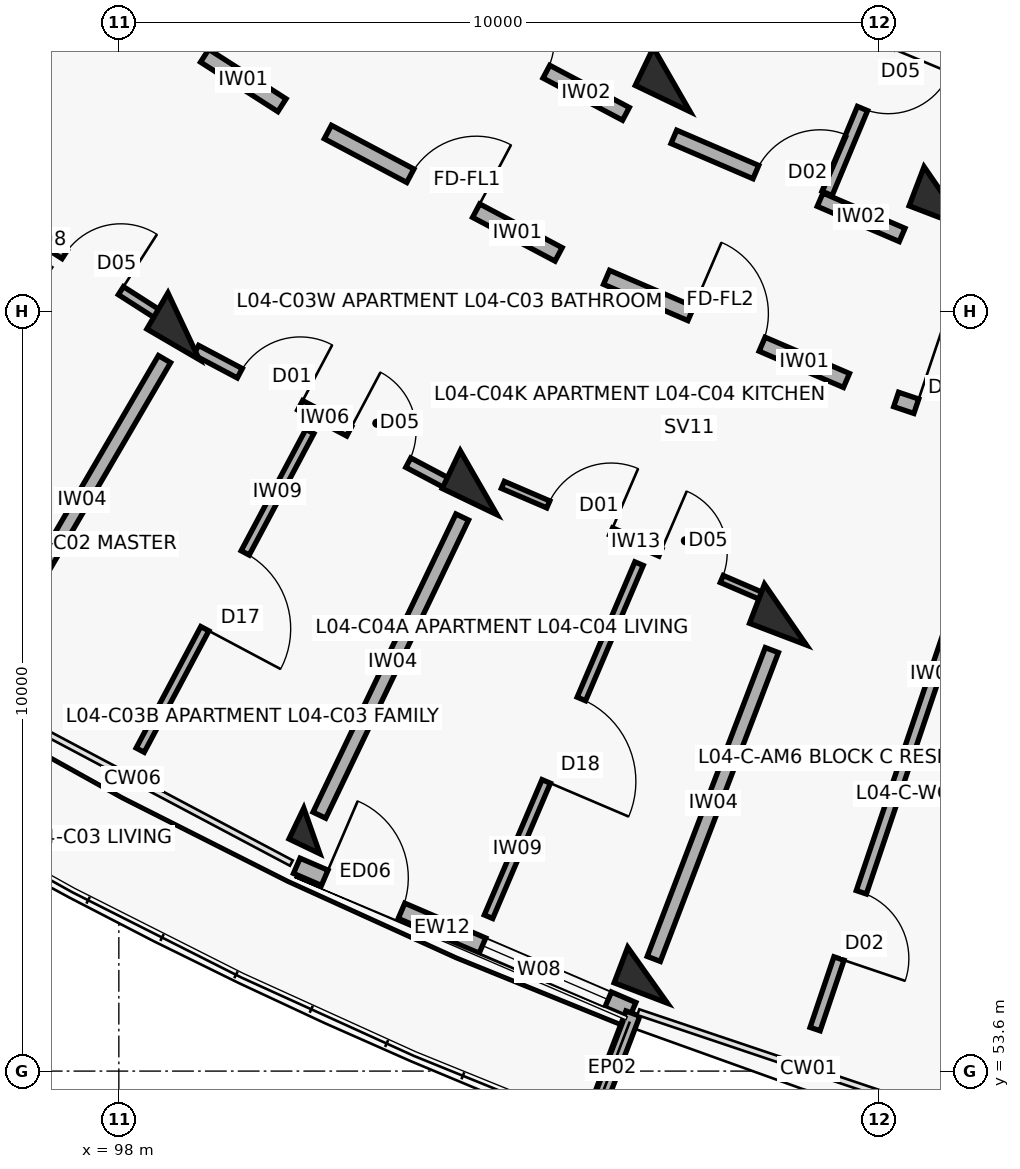
"""IFC4 building model, lengths in metres.
Left out: names, types, materials, properties, quantities, classifications, styles, units other than length and angle.
Written with IfcOpenShell. Run it as: python <this file> out.ifc"""

import sys

from ifc_helpers import new_model, si_unit, direction, frame, frame_2d, origin, origin_2d, place, context, subcontext, project, spatial, rectangle, extrude, element, fill, save


model = new_model("IFC4")
c1 = context("Model", 3, precision=1e-05, world=origin(), true_north=direction((0.0, 1.0)))
c2 = subcontext(c1, "Body", "Model", "MODEL_VIEW")
j1 = project(units=[si_unit("LENGTHUNIT", "METRE"), si_unit("PLANEANGLEUNIT", "RADIAN")], contexts=[c1])
p1 = place(None, origin())
s1 = spatial("IfcSite", under=j1, at=p1, CompositionType="ELEMENT")
p2 = place(p1, origin())
s2 = spatial("IfcBuilding", under=s1, at=p2, CompositionType="ELEMENT")
p3 = place(p2, frame((0.0, 0.0, 14.3)))
s3 = spatial("IfcBuildingStorey", under=s2, at=p3, CompositionType="ELEMENT", Elevation=14.3)
for number, where, z_axis, x_axis in (
    (1, (98.853, 63.4, 0.0), (0.0, 0.0, 1.0), (-0.504, -0.864, 0.0)),
    (2, (105.274, 66.644, 0.0), (0.0, 0.0, 1.0), (-0.432, -0.902, 0.0)),
    (3, (102.734, 61.341, 0.0), (0.0, 0.0, 1.0), (-0.432, -0.902, 0.0)),
):
    element("IfcColumn", number, at=place(p3, frame(where, z_axis=z_axis, x_axis=x_axis)), inside=s3, PredefinedType="COLUMN", context=c2, shape_type="SweptSolid", body=[
        extrude(rectangle(XDim=0.55, YDim=0.8, at=origin_2d()), origin(), (0.0, 0.0, 1.0), 3.1),
    ])
p4 = place(p3, frame((100.539, 56.76, 0.0), z_axis=(0.0, 0.0, 1.0), x_axis=(-0.432085748802, -0.901832526405, 0.0)))
e4 = element("IfcColumn", 4, at=p4, inside=s3, PredefinedType="COLUMN", context=c2, shape_type="SweptSolid", body=[
    extrude(rectangle(XDim=0.45, YDim=0.45, at=origin_2d()), origin(), (0.0, 0.0, 1.0), 3.1),
])
for number, where, z_axis, x_axis in (
    (5, (108.869, 65.099, 0.0), (0.0, 0.0, 1.0), (-0.357, -0.934, 0.0)),
    (6, (106.77, 59.606, 0.0), (0.0, 0.0, 1.0), (-0.357, -0.934, 0.0)),
):
    element("IfcColumn", number, at=place(p3, frame(where, z_axis=z_axis, x_axis=x_axis)), inside=s3, PredefinedType="COLUMN", context=c2, shape_type="SweptSolid", body=[
        extrude(rectangle(XDim=0.55, YDim=0.8, at=origin_2d()), origin(), (0.0, 0.0, 1.0), 3.1),
    ])
p5 = place(p3, frame((104.956, 54.861, 0.0), z_axis=(0.0, 0.0, 1.0), x_axis=(-0.357064076459, -0.934079892355, 0.0)))
e7 = element("IfcColumn", 7, at=p5, inside=s3, PredefinedType="COLUMN", context=c2, shape_type="SweptSolid", body=[
    extrude(rectangle(XDim=0.5, YDim=0.75, at=origin_2d()), origin(), (0.0, 0.0, 1.0), 3.1),
])
p6 = place(p3, frame((100.341, 56.301, 0.0), z_axis=(0.0, 0.0, 1.0), x_axis=(0.918737524932, -0.39486878869, 0.0)))
e8 = element("IfcWall", 8, at=p6, inside=s3, PredefinedType="SOLIDWALL", context=c2, shape_type="SweptSolid", body=[
    extrude(rectangle(XDim=4.809, YDim=0.218, at=frame_2d((2.405, 0.0))), origin(), (0.0, 0.0, 1.0), 2.25),
])
p7 = place(p6, frame((0.4, 0.0, 0.0)))
e9 = element("IfcOpeningElement", 9, at=p7, cuts=e8, PredefinedType="OPENING", context=c2, shape_type="SweptSolid", body=[
    extrude(rectangle(XDim=1.1, YDim=2.15, at=frame_2d((0.55, 1.075))), frame((0.0, 0.119, 0.0), z_axis=(0.0, -1.0, 0.0), x_axis=(1.0, 0.0, 0.0)), (0.0, 0.0, 1.0), 0.238),
])
p8 = place(p6, frame((2.659, 0.0, 0.35)))
e10 = element("IfcOpeningElement", 10, at=p8, cuts=e8, PredefinedType="OPENING", context=c2, shape_type="SweptSolid", body=[
    extrude(rectangle(XDim=1.8, YDim=1.65, at=frame_2d((0.9, 0.825))), frame((0.0, 0.119, 0.0), z_axis=(0.0, -1.0, 0.0), x_axis=(1.0, 0.0, 0.0)), (0.0, 0.0, 1.0), 0.238),
])
p9 = place(p3, frame((104.763, 54.357, 0.0), z_axis=(0.0, 0.0, 1.0), x_axis=(-0.356957296461, -0.934120703391, 0.0)))
e11 = element("IfcWall", 11, at=p9, inside=s3, PredefinedType="PARAPET", context=c2, shape_type="SweptSolid", body=[
    extrude(rectangle(XDim=1.53, YDim=0.195, at=frame_2d((0.765, 0.0))), origin(), (0.0, 0.0, 1.0), 2.25),
])
p10 = place(p3, frame((97.252, 68.161, 0.0), z_axis=(0.0, 0.0, 1.0), x_axis=(0.842289466461, -0.53902546757, 0.0)))
e12 = element("IfcWall", 12, at=p10, inside=s3, PredefinedType="SOLIDWALL", context=c2, shape_type="SweptSolid", body=[
    extrude(rectangle(XDim=3.436, YDim=0.2, at=frame_2d((1.718, 0.0))), origin(), (0.0, 0.0, 1.0), 2.08),
])
p11 = place(p10, frame((1.208, 0.0, 0.0)))
e13 = element("IfcOpeningElement", 13, at=p11, cuts=e12, PredefinedType="OPENING", context=c2, shape_type="SweptSolid", body=[
    extrude(rectangle(XDim=1.02, YDim=2.15, at=frame_2d((0.51, 1.075))), frame((0.0, 0.11, 0.0), z_axis=(0.0, -1.0, 0.0), x_axis=(1.0, 0.0, 0.0)), (0.0, 0.0, 1.0), 0.22),
])
p12 = place(p3, frame((95.376, 65.565, 0.0), z_axis=(0.0, 0.0, 1.0), x_axis=(0.842242208372, -0.539099306656, 0.0)))
e14 = element("IfcWall", 14, at=p12, inside=s3, PredefinedType="PARTITIONING", context=c2, shape_type="SweptSolid", body=[
    extrude(rectangle(XDim=3.797, YDim=0.125, at=frame_2d((1.899, 0.0))), origin(), (0.0, 0.0, 1.0), 2.08),
])
p13 = place(p12, frame((0.65, 0.0, 0.0)))
e15 = element("IfcOpeningElement", 15, at=p13, cuts=e14, PredefinedType="OPENING", context=c2, shape_type="SweptSolid", body=[
    extrude(rectangle(XDim=0.9, YDim=2.1, at=frame_2d((0.45, 1.05))), frame((0.0, 0.073, 0.0), z_axis=(0.0, -1.0, 0.0), x_axis=(1.0, 0.0, 0.0)), (0.0, 0.0, 1.0), 0.145),
])
p14 = place(p12, frame((2.267, 0.0, 0.0)))
e16 = element("IfcOpeningElement", 16, at=p14, cuts=e14, PredefinedType="OPENING", context=c2, shape_type="SweptSolid", body=[
    extrude(rectangle(XDim=0.88, YDim=2.1, at=frame_2d((0.44, 1.05))), frame((0.0, 0.073, 0.0), z_axis=(0.0, -1.0, 0.0), x_axis=(1.0, 0.0, 0.0)), (0.0, 0.0, 1.0), 0.145),
])
p15 = place(p3, frame((100.75, 65.956, 0.0), z_axis=(0.0, 0.0, 1.0), x_axis=(0.883440266101, -0.468543803963, 0.0)))
e17 = element("IfcWall", 17, at=p15, inside=s3, PredefinedType="SOLIDWALL", context=c2, shape_type="SweptSolid", body=[
    extrude(rectangle(XDim=3.436, YDim=0.2, at=frame_2d((1.718, 0.0))), origin(), (0.0, 0.0, 1.0), 2.08),
])
p16 = place(p15, frame((1.228, 0.0, 0.0)))
e18 = element("IfcOpeningElement", 18, at=p16, cuts=e17, PredefinedType="OPENING", context=c2, shape_type="SweptSolid", body=[
    extrude(rectangle(XDim=0.98, YDim=2.15, at=frame_2d((0.49, 1.075))), frame((0.0, 0.11, 0.0), z_axis=(0.0, -1.0, 0.0), x_axis=(1.0, 0.0, 0.0)), (0.0, 0.0, 1.0), 0.22),
])
p17 = place(p3, frame((101.784, 67.726, 0.0), z_axis=(0.0, 0.0, 1.0), x_axis=(0.883444301944, -0.468536194293, 0.0)))
e19 = element("IfcWall", 19, at=p17, inside=s3, PredefinedType="SOLIDWALL", context=c2, shape_type="SweptSolid", body=[
    extrude(rectangle(XDim=3.269, YDim=0.19, at=frame_2d((1.634, 0.0))), origin(), (0.0, 0.0, 1.0), 2.08),
])
p18 = place(p17, frame((1.184, 0.0, 0.0)))
e20 = element("IfcOpeningElement", 20, at=p18, cuts=e19, PredefinedType="OPENING", context=c2, shape_type="SweptSolid", body=[
    extrude(rectangle(XDim=0.9, YDim=2.1, at=frame_2d((0.45, 1.05))), frame((0.0, 0.105, 0.0), z_axis=(0.0, -1.0, 0.0), x_axis=(1.0, 0.0, 0.0)), (0.0, 0.0, 1.0), 0.21),
])
p19 = place(p3, frame((99.017, 63.087, 0.0), z_axis=(0.0, 0.0, 1.0), x_axis=(0.883415075746, -0.468591297342, 0.0)))
e21 = element("IfcWall", 21, at=p19, inside=s3, PredefinedType="PARTITIONING", context=c2, shape_type="SweptSolid", body=[
    extrude(rectangle(XDim=3.81, YDim=0.14, at=frame_2d((1.905, 0.0))), origin(), (0.0, 0.0, 1.0), 2.08),
])
p20 = place(p19, frame((0.65, 0.0, 0.0)))
e22 = element("IfcOpeningElement", 22, at=p20, cuts=e21, PredefinedType="OPENING", context=c2, shape_type="SweptSolid", body=[
    extrude(rectangle(XDim=0.9, YDim=2.1, at=frame_2d((0.45, 1.05))), frame((0.0, 0.08, 0.0), z_axis=(0.0, -1.0, 0.0), x_axis=(1.0, 0.0, 0.0)), (0.0, 0.0, 1.0), 0.16),
])
p21 = place(p19, frame((2.28, 0.0, 0.0)))
e23 = element("IfcOpeningElement", 23, at=p21, cuts=e21, PredefinedType="OPENING", context=c2, shape_type="SweptSolid", body=[
    extrude(rectangle(XDim=0.88, YDim=2.1, at=frame_2d((0.44, 1.05))), frame((0.0, 0.08, 0.0), z_axis=(0.0, -1.0, 0.0), x_axis=(1.0, 0.0, 0.0)), (0.0, 0.0, 1.0), 0.16),
])
p22 = place(p3, frame((100.513, 62.016, 0.0), z_axis=(0.0, 0.0, 1.0), x_axis=(-0.469889133168, -0.882725440061, 0.0)))
e24 = element("IfcWall", 24, at=p22, inside=s3, PredefinedType="PARTITIONING", context=c2, shape_type="SweptSolid", body=[
    extrude(rectangle(XDim=4.75, YDim=0.12, at=frame_2d((2.375, 0.0))), origin(), (0.0, 0.0, 1.0), 2.08),
])
p23 = place(p22, frame((1.81, 0.0, 0.0)))
e25 = element("IfcOpeningElement", 25, at=p23, cuts=e24, PredefinedType="OPENING", context=c2, shape_type="SweptSolid", body=[
    extrude(rectangle(XDim=1.13, YDim=2.1, at=frame_2d((0.565, 1.05))), frame((0.0, 0.07, 0.0), z_axis=(0.0, -1.0, 0.0), x_axis=(1.0, 0.0, 0.0)), (0.0, 0.0, 1.0), 0.14),
])
p24 = place(p3, frame((98.601, 62.968, 0.0), z_axis=(0.0, 0.0, 1.0), x_axis=(-0.504216452091, -0.863577309475, 0.0)))
e26 = element("IfcWall", 26, at=p24, inside=s3, PredefinedType="SOLIDWALL", context=c2, shape_type="SweptSolid", body=[
    extrude(rectangle(XDim=4.35, YDim=0.185, at=frame_2d((2.175, 0.0))), origin(), (0.0, 0.0, 1.0), 2.08),
])
p25 = place(p3, frame((104.417, 64.044, 0.0), z_axis=(0.0, 0.0, 1.0), x_axis=(0.918718172399, -0.394913813008, 0.0)))
e27 = element("IfcWall", 27, at=p25, inside=s3, PredefinedType="SOLIDWALL", context=c2, shape_type="SweptSolid", body=[
    extrude(rectangle(XDim=3.436, YDim=0.2, at=frame_2d((1.718, 0.0))), origin(), (0.0, 0.0, 1.0), 2.08),
])
p26 = place(p25, frame((1.208, 0.0, 0.0)))
e28 = element("IfcOpeningElement", 28, at=p26, cuts=e27, PredefinedType="OPENING", context=c2, shape_type="SweptSolid", body=[
    extrude(rectangle(XDim=1.02, YDim=2.15, at=frame_2d((0.51, 1.075))), frame((0.0, 0.11, 0.0), z_axis=(0.0, -1.0, 0.0), x_axis=(1.0, 0.0, 0.0)), (0.0, 0.0, 1.0), 0.22),
])
p27 = place(p3, frame((105.302, 65.893, 0.0), z_axis=(0.0, 0.0, 1.0), x_axis=(0.918723391052, -0.394901672235, 0.0)))
e29 = element("IfcWall", 29, at=p27, inside=s3, PredefinedType="SOLIDWALL", context=c2, shape_type="SweptSolid", body=[
    extrude(rectangle(XDim=3.269, YDim=0.19, at=frame_2d((1.634, 0.0))), origin(), (0.0, 0.0, 1.0), 2.08),
])
p28 = place(p27, frame((1.174, 0.0, 0.0)))
e30 = element("IfcOpeningElement", 30, at=p28, cuts=e29, PredefinedType="OPENING", context=c2, shape_type="SweptSolid", body=[
    extrude(rectangle(XDim=0.92, YDim=2.1, at=frame_2d((0.46, 1.05))), frame((0.0, 0.105, 0.0), z_axis=(0.0, -1.0, 0.0), x_axis=(1.0, 0.0, 0.0)), (0.0, 0.0, 1.0), 0.21),
])
p29 = place(p3, frame((108.589, 68.194, 0.0), z_axis=(0.0, 0.0, 1.0), x_axis=(-0.385151143297, -0.922853507777, 0.0)))
e31 = element("IfcWall", 31, at=p29, inside=s3, PredefinedType="PARTITIONING", context=c2, shape_type="SweptSolid", body=[
    extrude(rectangle(XDim=3.3, YDim=0.145, at=frame_2d((1.65, 0.0))), origin(), (0.0, 0.0, 1.0), 2.08),
])
p30 = place(p29, frame((1.21, 0.0, 0.0)))
e32 = element("IfcOpeningElement", 32, at=p30, cuts=e31, PredefinedType="OPENING", context=c2, shape_type="SweptSolid", body=[
    extrude(rectangle(XDim=0.88, YDim=2.1, at=frame_2d((0.44, 1.05))), frame((0.0, 0.083, 0.0), z_axis=(0.0, -1.0, 0.0), x_axis=(1.0, 0.0, 0.0)), (0.0, 0.0, 1.0), 0.165),
])
p31 = place(p3, frame((103.052, 61.313, 0.0), z_axis=(0.0, 0.0, 1.0), x_axis=(0.918714121981, -0.39492323567, 0.0)))
e33 = element("IfcWall", 33, at=p31, inside=s3, PredefinedType="PARTITIONING", context=c2, shape_type="SweptSolid", body=[
    extrude(rectangle(XDim=3.785, YDim=0.1, at=frame_2d((1.893, 0.0))), origin(), (0.0, 0.0, 1.0), 2.08),
])
p32 = place(p31, frame((0.65, 0.0, 0.0)))
e34 = element("IfcOpeningElement", 34, at=p32, cuts=e33, PredefinedType="OPENING", context=c2, shape_type="SweptSolid", body=[
    extrude(rectangle(XDim=0.9, YDim=2.1, at=frame_2d((0.45, 1.05))), frame((0.0, 0.06, 0.0), z_axis=(0.0, -1.0, 0.0), x_axis=(1.0, 0.0, 0.0)), (0.0, 0.0, 1.0), 0.12),
])
p33 = place(p31, frame((2.255, 0.0, 0.0)))
e35 = element("IfcOpeningElement", 35, at=p33, cuts=e33, PredefinedType="OPENING", context=c2, shape_type="SweptSolid", body=[
    extrude(rectangle(XDim=0.88, YDim=2.1, at=frame_2d((0.44, 1.05))), frame((0.0, 0.06, 0.0), z_axis=(0.0, -1.0, 0.0), x_axis=(1.0, 0.0, 0.0)), (0.0, 0.0, 1.0), 0.12),
])
p34 = place(p3, frame((104.844, 60.277, 0.0), z_axis=(0.0, 0.0, 1.0), x_axis=(-0.392127280422, -0.919910971751, 0.0)))
e36 = element("IfcWall", 36, at=p34, inside=s3, PredefinedType="PARTITIONING", context=c2, shape_type="SweptSolid", body=[
    extrude(rectangle(XDim=5.05, YDim=0.12, at=frame_2d((2.525, 0.0))), origin(), (0.0, 0.0, 1.0), 2.08),
])
p35 = place(p34, frame((1.935, 0.0, 0.0)))
e37 = element("IfcOpeningElement", 37, at=p35, cuts=e36, PredefinedType="OPENING", context=c2, shape_type="SweptSolid", body=[
    extrude(rectangle(XDim=1.18, YDim=2.1, at=frame_2d((0.59, 1.05))), frame((0.0, 0.07, 0.0), z_axis=(0.0, -1.0, 0.0), x_axis=(1.0, 0.0, 0.0)), (0.0, 0.0, 1.0), 0.14),
])
p36 = place(p3, frame((102.518, 60.89, 0.0), z_axis=(0.0, 0.0, 1.0), x_axis=(-0.432108769108, -0.901821496561, 0.0)))
e38 = element("IfcWall", 38, at=p36, inside=s3, PredefinedType="SOLIDWALL", context=c2, shape_type="SweptSolid", body=[
    extrude(rectangle(XDim=4.35, YDim=0.185, at=frame_2d((2.175, 0.0))), origin(), (0.0, 0.0, 1.0), 2.08),
])
p37 = place(p3, frame((108.227, 62.437, 0.0), z_axis=(0.0, 0.0, 1.0), x_axis=(0.947884468821, -0.318614239745, 0.0)))
e39 = element("IfcWall", 39, at=p37, inside=s3, PredefinedType="SOLIDWALL", context=c2, shape_type="SweptSolid", body=[
    extrude(rectangle(XDim=3.436, YDim=0.2, at=frame_2d((1.718, 0.0))), origin(), (0.0, 0.0, 1.0), 2.08),
])
p38 = place(p37, frame((0.28, 0.0, 0.0)))
e40 = element("IfcOpeningElement", 40, at=p38, cuts=e39, PredefinedType="OPENING", context=c2, shape_type="SweptSolid", body=[
    extrude(rectangle(XDim=1.12, YDim=2.15, at=frame_2d((0.56, 1.075))), frame((0.0, 0.11, 0.0), z_axis=(0.0, -1.0, 0.0), x_axis=(1.0, 0.0, 0.0)), (0.0, 0.0, 1.0), 0.22),
])
p39 = place(p37, frame((2.266, 0.0, 0.0)))
e41 = element("IfcOpeningElement", 41, at=p39, cuts=e39, PredefinedType="OPENING", context=c2, shape_type="SweptSolid", body=[
    extrude(rectangle(XDim=0.95, YDim=2.1, at=frame_2d((0.475, 1.05))), frame((0.0, 0.11, 0.0), z_axis=(0.0, -1.0, 0.0), x_axis=(1.0, 0.0, 0.0)), (0.0, 0.0, 1.0), 0.22),
])
p40 = place(p3, frame((109.705, 61.685, 0.0), z_axis=(0.0, 0.0, 1.0), x_axis=(-0.320057771325, -0.947398027766, 0.0)))
e42 = element("IfcWall", 42, at=p40, inside=s3, PredefinedType="PARTITIONING", context=c2, shape_type="SweptSolid", body=[
    extrude(rectangle(XDim=7.95, YDim=0.14, at=frame_2d((3.975, 0.0))), origin(), (0.0, 0.0, 1.0), 2.08),
])
p41 = place(p40, frame((6.05, 0.0, 0.0)))
e43 = element("IfcOpeningElement", 43, at=p41, cuts=e42, PredefinedType="OPENING", context=c2, shape_type="SweptSolid", body=[
    extrude(rectangle(XDim=0.92, YDim=2.1, at=frame_2d((0.46, 1.05))), frame((0.0, 0.08, 0.0), z_axis=(0.0, -1.0, 0.0), x_axis=(1.0, 0.0, 0.0)), (0.0, 0.0, 1.0), 0.16),
])
p42 = place(p3, frame((106.591, 59.139, 0.0), z_axis=(0.0, 0.0, 1.0), x_axis=(-0.357064016205, -0.934079915388, 0.0)))
e44 = element("IfcWall", 44, at=p42, inside=s3, PredefinedType="SOLIDWALL", context=c2, shape_type="SweptSolid", body=[
    extrude(rectangle(XDim=4.35, YDim=0.185, at=frame_2d((2.175, 0.0))), origin(), (0.0, 0.0, 1.0), 2.08),
])
p43 = place(p7, origin())
e45 = element("IfcDoor", 45, at=p43, inside=s3, OperationType="SINGLE_SWING_LEFT", PredefinedType="DOOR", context=c2, shape_type="SweptSolid", body=[
    extrude(rectangle(XDim=1.1, YDim=2.15, at=frame_2d((0.55, 1.075))), frame((0.0, 0.025, 0.0), z_axis=(0.0, -1.0, 0.0), x_axis=(1.0, 0.0, 0.0)), (0.0, 0.0, 1.0), 0.05),
])
fill(e9, e45)
p44 = place(p8, origin())
e46 = element("IfcWindow", 46, at=p44, inside=s3, PartitioningType="TRIPLE_PANEL_VERTICAL", PredefinedType="WINDOW", context=c2, shape_type="SweptSolid", body=[
    extrude(rectangle(XDim=1.8, YDim=1.65, at=frame_2d((0.9, 0.825))), frame((0.0, 0.03, 0.0), z_axis=(0.0, -1.0, 0.0), x_axis=(1.0, 0.0, 0.0)), (0.0, 0.0, 1.0), 0.06),
])
fill(e10, e46)
p45 = place(p11, origin())
e47 = element("IfcDoor", 47, at=p45, inside=s3, OperationType="SINGLE_SWING_RIGHT", PredefinedType="DOOR", context=c2, shape_type="SweptSolid", body=[
    extrude(rectangle(XDim=1.02, YDim=2.15, at=frame_2d((0.51, 1.075))), frame((0.0, 0.025, 0.0), z_axis=(0.0, -1.0, 0.0), x_axis=(1.0, 0.0, 0.0)), (0.0, 0.0, 1.0), 0.05),
])
fill(e13, e47)
p46 = place(p14, origin())
e48 = element("IfcDoor", 48, at=p46, inside=s3, OperationType="SINGLE_SWING_RIGHT", PredefinedType="DOOR", context=c2, shape_type="SweptSolid", body=[
    extrude(rectangle(XDim=0.88, YDim=2.1, at=frame_2d((0.44, 1.05))), frame((0.0, 0.025, 0.0), z_axis=(0.0, -1.0, 0.0), x_axis=(1.0, 0.0, 0.0)), (0.0, 0.0, 1.0), 0.05),
])
fill(e16, e48)
p47 = place(p16, origin())
e49 = element("IfcDoor", 49, at=p47, inside=s3, OperationType="SINGLE_SWING_RIGHT", PredefinedType="DOOR", context=c2, shape_type="SweptSolid", body=[
    extrude(rectangle(XDim=0.98, YDim=2.15, at=frame_2d((0.49, 1.075))), frame((0.0, 0.025, 0.0), z_axis=(0.0, -1.0, 0.0), x_axis=(1.0, 0.0, 0.0)), (0.0, 0.0, 1.0), 0.05),
])
fill(e18, e49)
p48 = place(p18, origin())
e50 = element("IfcDoor", 50, at=p48, inside=s3, OperationType="SINGLE_SWING_LEFT", PredefinedType="DOOR", context=c2, shape_type="SweptSolid", body=[
    extrude(rectangle(XDim=0.9, YDim=2.1, at=frame_2d((0.45, 1.05))), frame((0.0, 0.025, 0.0), z_axis=(0.0, -1.0, 0.0), x_axis=(1.0, 0.0, 0.0)), (0.0, 0.0, 1.0), 0.05),
])
fill(e20, e50)
p49 = place(p20, origin())
e51 = element("IfcDoor", 51, at=p49, inside=s3, OperationType="SINGLE_SWING_RIGHT", PredefinedType="DOOR", context=c2, shape_type="SweptSolid", body=[
    extrude(rectangle(XDim=0.9, YDim=2.1, at=frame_2d((0.45, 1.05))), frame((0.0, 0.025, 0.0), z_axis=(0.0, -1.0, 0.0), x_axis=(1.0, 0.0, 0.0)), (0.0, 0.0, 1.0), 0.05),
])
fill(e22, e51)
p50 = place(p21, origin())
e52 = element("IfcDoor", 52, at=p50, inside=s3, OperationType="SINGLE_SWING_LEFT", PredefinedType="DOOR", context=c2, shape_type="SweptSolid", body=[
    extrude(rectangle(XDim=0.88, YDim=2.1, at=frame_2d((0.44, 1.05))), frame((0.0, 0.025, 0.0), z_axis=(0.0, -1.0, 0.0), x_axis=(1.0, 0.0, 0.0)), (0.0, 0.0, 1.0), 0.05),
])
fill(e23, e52)
p51 = place(p23, origin())
e53 = element("IfcDoor", 53, at=p51, inside=s3, OperationType="SINGLE_SWING_RIGHT", PredefinedType="DOOR", context=c2, shape_type="SweptSolid", body=[
    extrude(rectangle(XDim=1.13, YDim=2.1, at=frame_2d((0.565, 1.05))), frame((0.0, 0.025, 0.0), z_axis=(0.0, -1.0, 0.0), x_axis=(1.0, 0.0, 0.0)), (0.0, 0.0, 1.0), 0.05),
])
fill(e25, e53)
p52 = place(p26, origin())
e54 = element("IfcDoor", 54, at=p52, inside=s3, OperationType="SINGLE_SWING_LEFT", PredefinedType="DOOR", context=c2, shape_type="SweptSolid", body=[
    extrude(rectangle(XDim=1.02, YDim=2.15, at=frame_2d((0.51, 1.075))), frame((0.0, 0.025, 0.0), z_axis=(0.0, -1.0, 0.0), x_axis=(1.0, 0.0, 0.0)), (0.0, 0.0, 1.0), 0.05),
])
fill(e28, e54)
p53 = place(p28, origin())
e55 = element("IfcDoor", 55, at=p53, inside=s3, OperationType="SINGLE_SWING_RIGHT", PredefinedType="DOOR", context=c2, shape_type="SweptSolid", body=[
    extrude(rectangle(XDim=0.92, YDim=2.1, at=frame_2d((0.46, 1.05))), frame((0.0, 0.025, 0.0), z_axis=(0.0, -1.0, 0.0), x_axis=(1.0, 0.0, 0.0)), (0.0, 0.0, 1.0), 0.05),
])
fill(e30, e55)
p54 = place(p30, origin())
e56 = element("IfcDoor", 56, at=p54, inside=s3, OperationType="SINGLE_SWING_LEFT", PredefinedType="DOOR", context=c2, shape_type="SweptSolid", body=[
    extrude(rectangle(XDim=0.88, YDim=2.1, at=frame_2d((0.44, 1.05))), frame((0.0, 0.025, 0.0), z_axis=(0.0, -1.0, 0.0), x_axis=(1.0, 0.0, 0.0)), (0.0, 0.0, 1.0), 0.05),
])
fill(e32, e56)
p55 = place(p32, origin())
e57 = element("IfcDoor", 57, at=p55, inside=s3, OperationType="SINGLE_SWING_RIGHT", PredefinedType="DOOR", context=c2, shape_type="SweptSolid", body=[
    extrude(rectangle(XDim=0.9, YDim=2.1, at=frame_2d((0.45, 1.05))), frame((0.0, 0.025, 0.0), z_axis=(0.0, -1.0, 0.0), x_axis=(1.0, 0.0, 0.0)), (0.0, 0.0, 1.0), 0.05),
])
fill(e34, e57)
p56 = place(p33, origin())
e58 = element("IfcDoor", 58, at=p56, inside=s3, OperationType="SINGLE_SWING_LEFT", PredefinedType="DOOR", context=c2, shape_type="SweptSolid", body=[
    extrude(rectangle(XDim=0.88, YDim=2.1, at=frame_2d((0.44, 1.05))), frame((0.0, 0.025, 0.0), z_axis=(0.0, -1.0, 0.0), x_axis=(1.0, 0.0, 0.0)), (0.0, 0.0, 1.0), 0.05),
])
fill(e35, e58)
p57 = place(p35, origin())
e59 = element("IfcDoor", 59, at=p57, inside=s3, OperationType="SINGLE_SWING_RIGHT", PredefinedType="DOOR", context=c2, shape_type="SweptSolid", body=[
    extrude(rectangle(XDim=1.18, YDim=2.1, at=frame_2d((0.59, 1.05))), frame((0.0, 0.025, 0.0), z_axis=(0.0, -1.0, 0.0), x_axis=(1.0, 0.0, 0.0)), (0.0, 0.0, 1.0), 0.05),
])
fill(e37, e59)
p58 = place(p38, origin())
e60 = element("IfcDoor", 60, at=p58, inside=s3, OperationType="SINGLE_SWING_LEFT", PredefinedType="DOOR", context=c2, shape_type="SweptSolid", body=[
    extrude(rectangle(XDim=1.12, YDim=2.15, at=frame_2d((0.56, 1.075))), frame((0.0, 0.025, 0.0), z_axis=(0.0, -1.0, 0.0), x_axis=(1.0, 0.0, 0.0)), (0.0, 0.0, 1.0), 0.05),
])
fill(e40, e60)
p59 = place(p41, origin())
e61 = element("IfcDoor", 61, at=p59, inside=s3, OperationType="SINGLE_SWING_RIGHT", PredefinedType="DOOR", context=c2, shape_type="SweptSolid", body=[
    extrude(rectangle(XDim=0.92, YDim=2.1, at=frame_2d((0.46, 1.05))), frame((0.0, 0.025, 0.0), z_axis=(0.0, -1.0, 0.0), x_axis=(1.0, 0.0, 0.0)), (0.0, 0.0, 1.0), 0.05),
])
fill(e43, e61)
save(model, sys.argv[1])
